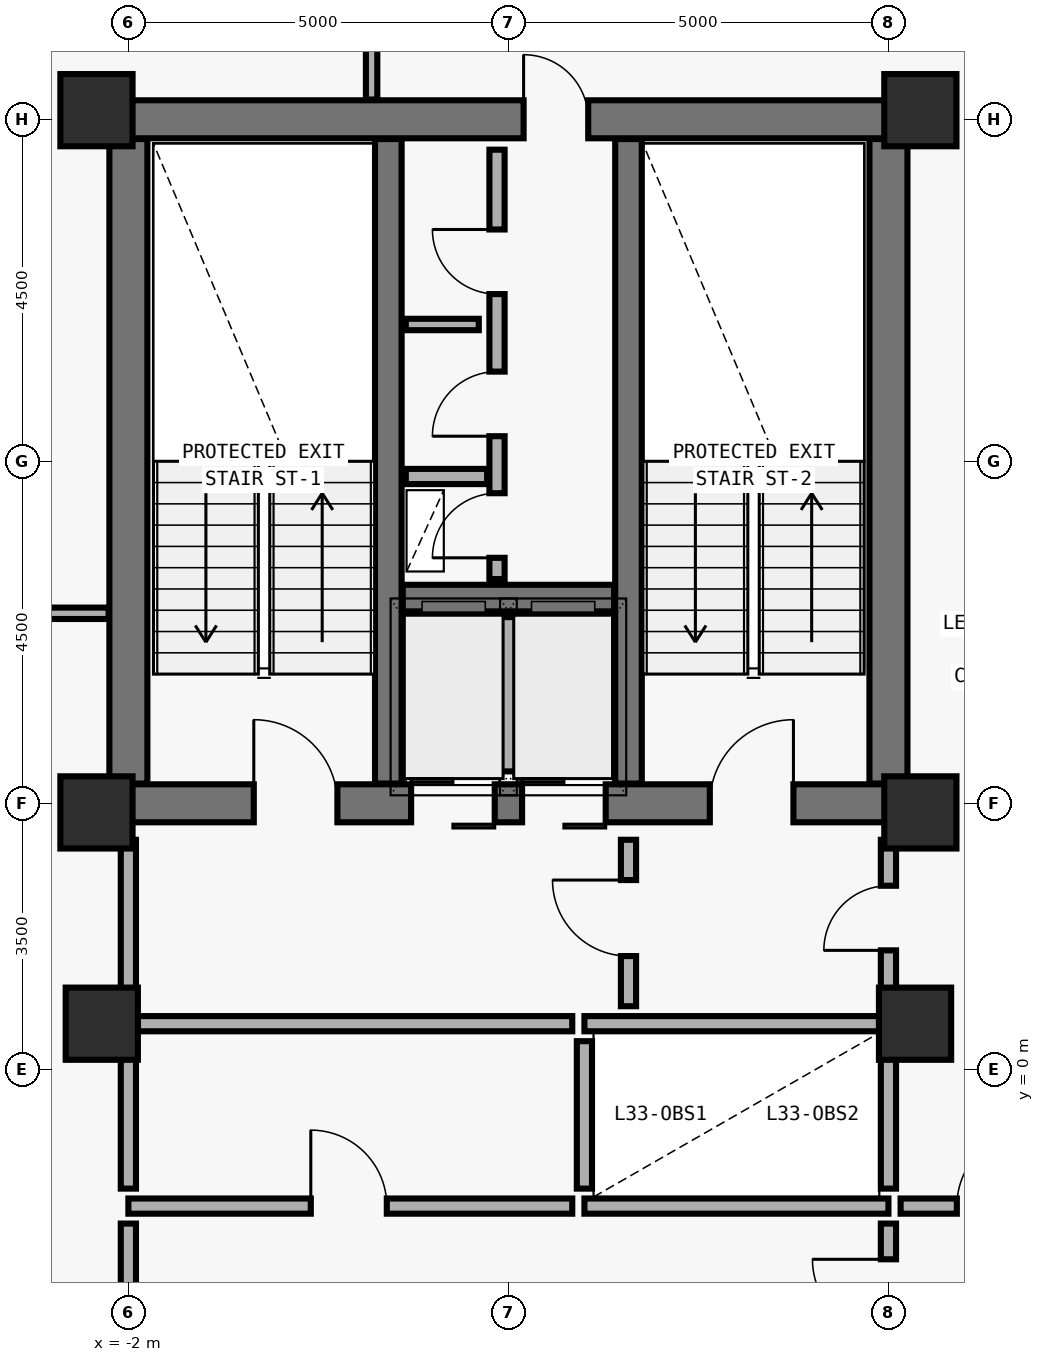
"""IFC4 building model, lengths in metres.
Left out: names, types, materials, properties, quantities, classifications, styles, units other than length and angle.
Written with IfcOpenShell. Run it as: python <this file> out.ifc"""

import sys

from ifc_helpers import new_model, si_unit, direction, frame, frame_2d, origin, origin_2d, place, context, subcontext, project, spatial, rectangle, extrude, element, fill, save


model = new_model("IFC4")
c1 = context("Model", 3, precision=1e-05, world=origin(), true_north=direction((0.0, 1.0)))
c2 = subcontext(c1, "Body", "Model", "MODEL_VIEW")
j1 = project(units=[si_unit("LENGTHUNIT", "METRE"), si_unit("PLANEANGLEUNIT", "RADIAN")], contexts=[c1])
p1 = place(None, origin())
s1 = spatial("IfcSite", under=j1, at=p1, CompositionType="ELEMENT")
p2 = place(p1, origin())
s2 = spatial("IfcBuilding", under=s1, at=p2, CompositionType="ELEMENT")
p3 = place(p2, frame((0.0, 0.0, 134.4)))
s3 = spatial("IfcBuildingStorey", under=s2, at=p3, CompositionType="ELEMENT", Elevation=134.4)
p4 = place(p3, frame((-2.0, 3.5, 0.0), z_axis=(0.0, 0.0, 1.0), x_axis=(1.0, 0.0, 0.0)))
e1 = element("IfcWall", 1, at=p4, inside=s3, PredefinedType="SHEAR", context=c2, shape_type="SweptSolid", body=[
    extrude(rectangle(XDim=10.0, YDim=0.5, at=frame_2d((5.0, 0.0))), origin(), (0.0, 0.0, 1.0), 3.892),
])
p5 = place(p4, frame((1.65, 0.0, 0.0)))
e2 = element("IfcOpeningElement", 2, at=p5, cuts=e1, PredefinedType="OPENING", context=c2, shape_type="SweptSolid", body=[
    extrude(rectangle(XDim=1.1, YDim=2.15, at=frame_2d((0.55, 1.075))), frame((0.0, 0.26, 0.0), z_axis=(0.0, -1.0, 0.0), x_axis=(1.0, 0.0, 0.0)), (0.0, 0.0, 1.0), 0.52),
])
p6 = place(p4, frame((7.65, 0.0, 0.0)))
e3 = element("IfcOpeningElement", 3, at=p6, cuts=e1, PredefinedType="OPENING", context=c2, shape_type="SweptSolid", body=[
    extrude(rectangle(XDim=1.1, YDim=2.15, at=frame_2d((0.55, 1.075))), frame((0.0, 0.26, 0.0), z_axis=(0.0, -1.0, 0.0), x_axis=(1.0, 0.0, 0.0)), (0.0, 0.0, 1.0), 0.52),
])
p7 = place(p4, frame((3.72, 0.0, 0.0)))
e4 = element("IfcOpeningElement", 4, at=p7, cuts=e1, PredefinedType="OPENING", context=c2, shape_type="SweptSolid", body=[
    extrude(rectangle(XDim=1.1, YDim=2.2, at=frame_2d((0.55, 1.1))), frame((0.0, 0.26, 0.0), z_axis=(0.0, -1.0, 0.0), x_axis=(1.0, 0.0, 0.0)), (0.0, 0.0, 1.0), 0.52),
])
p8 = place(p4, frame((5.18, 0.0, 0.0)))
e5 = element("IfcOpeningElement", 5, at=p8, cuts=e1, PredefinedType="OPENING", context=c2, shape_type="SweptSolid", body=[
    extrude(rectangle(XDim=1.1, YDim=2.2, at=frame_2d((0.55, 1.1))), frame((0.0, 0.26, 0.0), z_axis=(0.0, -1.0, 0.0), x_axis=(1.0, 0.0, 0.0)), (0.0, 0.0, 1.0), 0.52),
])
p9 = place(p3, frame((-2.0, 12.5, 0.0), z_axis=(0.0, 0.0, 1.0), x_axis=(1.0, 0.0, 0.0)))
e6 = element("IfcWall", 6, at=p9, inside=s3, PredefinedType="SHEAR", context=c2, shape_type="SweptSolid", body=[
    extrude(rectangle(XDim=10.0, YDim=0.5, at=frame_2d((5.0, 0.0))), origin(), (0.0, 0.0, 1.0), 3.892),
])
p10 = place(p9, frame((5.2, 0.0, 0.0)))
e7 = element("IfcOpeningElement", 7, at=p10, cuts=e6, PredefinedType="OPENING", context=c2, shape_type="SweptSolid", body=[
    extrude(rectangle(XDim=0.85, YDim=2.1, at=frame_2d((0.425, 1.05))), frame((0.0, 0.26, 0.0), z_axis=(0.0, -1.0, 0.0), x_axis=(1.0, 0.0, 0.0)), (0.0, 0.0, 1.0), 0.52),
])
for number, where, z_axis, x_axis in (
    (8, (-2.0, 3.76, 0.0), (0.0, 0.0, 1.0), (0.0, 1.0, 0.0)),
    (9, (8.0, 3.76, 0.0), (0.0, 0.0, 1.0), (0.0, 1.0, 0.0)),
):
    element("IfcWall", number, at=place(p3, frame(where, z_axis=z_axis, x_axis=x_axis)), inside=s3, PredefinedType="SHEAR", context=c2, shape_type="SweptSolid", body=[
        extrude(rectangle(XDim=8.48, YDim=0.5, at=frame_2d((4.24, 0.0))), origin(), (0.0, 0.0, 1.0), 3.892),
    ])
for number, where, z_axis, x_axis in (
    (10, (1.42, 3.76, 0.0), (0.0, 0.0, 1.0), (0.0, 1.0, 0.0)),
    (11, (4.58, 3.76, 0.0), (0.0, 0.0, 1.0), (0.0, 1.0, 0.0)),
):
    element("IfcWall", number, at=place(p3, frame(where, z_axis=z_axis, x_axis=x_axis)), inside=s3, PredefinedType="SHEAR", context=c2, shape_type="SweptSolid", body=[
        extrude(rectangle(XDim=8.48, YDim=0.35, at=frame_2d((4.24, 0.0))), origin(), (0.0, 0.0, 1.0), 3.892),
    ])
p11 = place(p3, frame((1.61, 6.2, 0.0), z_axis=(0.0, 0.0, 1.0), x_axis=(1.0, 0.0, 0.0)))
e12 = element("IfcWall", 12, at=p11, inside=s3, PredefinedType="SHEAR", context=c2, shape_type="SweptSolid", body=[
    extrude(rectangle(XDim=2.78, YDim=0.35, at=frame_2d((1.39, 0.0))), origin(), (0.0, 0.0, 1.0), 3.892),
])
for number, where, z_axis, x_axis in (
    (13, (-2.42, 12.62, 0.0), (0.0, 0.0, 1.0), (1.0, 0.0, 0.0)),
    (14, (8.42, 12.62, 0.0), (0.0, 0.0, 1.0), (1.0, 0.0, 0.0)),
    (15, (-2.42, 3.38, 0.0), (0.0, 0.0, 1.0), (1.0, 0.0, 0.0)),
    (16, (8.42, 3.38, 0.0), (0.0, 0.0, 1.0), (1.0, 0.0, 0.0)),
    (17, (-2.35, 0.6, 0.0), (0.0, 0.0, 1.0), (1.0, 0.0, 0.0)),
    (18, (8.35, 0.6, 0.0), (0.0, 0.0, 1.0), (1.0, 0.0, 0.0)),
):
    element("IfcColumn", number, at=place(p3, frame(where, z_axis=z_axis, x_axis=x_axis)), inside=s3, PredefinedType="COLUMN", context=c2, shape_type="SweptSolid", body=[
        extrude(rectangle(XDim=0.95, YDim=0.95, at=origin_2d()), origin(), (0.0, 0.0, 1.0), 3.875),
    ])
p12 = place(p3, frame((3.0, 3.92, 0.0), z_axis=(0.0, 0.0, 1.0), x_axis=(0.0, 1.0, 0.0)))
e19 = element("IfcWall", 19, at=p12, inside=s3, PredefinedType="SOLIDWALL", context=c2, shape_type="SweptSolid", body=[
    extrude(rectangle(XDim=2.03, YDim=0.2, at=frame_2d((1.015, 0.0))), origin(), (0.0, 0.0, 1.0), 3.64),
])
p13 = place(p3, frame((1.65, 7.8, 0.0), z_axis=(0.0, 0.0, 1.0), x_axis=(1.0, 0.0, 0.0)))
e20 = element("IfcWall", 20, at=p13, inside=s3, PredefinedType="SOLIDWALL", context=c2, shape_type="SweptSolid", body=[
    extrude(rectangle(XDim=1.07, YDim=0.2, at=frame_2d((0.535, 0.0))), origin(), (0.0, 0.0, 1.0), 3.64),
])
p14 = place(p3, frame((4.0, 0.6, 0.0), z_axis=(0.0, 0.0, 1.0), x_axis=(1.0, 0.0, 0.0)))
e21 = element("IfcWall", 21, at=p14, inside=s3, PredefinedType="SOLIDWALL", context=c2, shape_type="SweptSolid", body=[
    extrude(rectangle(XDim=3.88, YDim=0.2, at=frame_2d((1.94, 0.0))), origin(), (0.0, 0.0, 1.0), 3.222),
])
p15 = place(p3, frame((4.0, -1.8, 0.0), z_axis=(0.0, 0.0, 1.0), x_axis=(1.0, 0.0, 0.0)))
e22 = element("IfcWall", 22, at=p15, inside=s3, PredefinedType="SOLIDWALL", context=c2, shape_type="SweptSolid", body=[
    extrude(rectangle(XDim=4.0, YDim=0.2, at=frame_2d((2.0, 0.0))), origin(), (0.0, 0.0, 1.0), 3.64),
])
p16 = place(p3, frame((4.0, -1.57, 0.0), z_axis=(0.0, 0.0, 1.0), x_axis=(0.0, 1.0, 0.0)))
e23 = element("IfcWall", 23, at=p16, inside=s3, PredefinedType="SOLIDWALL", context=c2, shape_type="SweptSolid", body=[
    extrude(rectangle(XDim=1.94, YDim=0.2, at=frame_2d((0.97, 0.0))), origin(), (0.0, 0.0, 1.0), 3.64),
])
p17 = place(p3, frame((8.0, -1.57, 0.0), z_axis=(0.0, 0.0, 1.0), x_axis=(0.0, 1.0, 0.0)))
e24 = element("IfcWall", 24, at=p17, inside=s3, PredefinedType="SOLIDWALL", context=c2, shape_type="SweptSolid", body=[
    extrude(rectangle(XDim=2.05, YDim=0.2, at=frame_2d((1.025, 0.0))), origin(), (0.0, 0.0, 1.0), 3.072),
])
p18 = place(p3, frame((2.85, 6.45, 0.0), z_axis=(0.0, 0.0, 1.0), x_axis=(0.0, 1.0, 0.0)))
e25 = element("IfcWall", 25, at=p18, inside=s3, PredefinedType="MOVABLE", context=c2, shape_type="SweptSolid", body=[
    extrude(rectangle(XDim=5.65, YDim=0.2, at=frame_2d((2.825, 0.0))), origin(), (0.0, 0.0, 1.0), 3.64),
])
p19 = place(p18, frame((1.88, 0.0, 0.0)))
e26 = element("IfcOpeningElement", 26, at=p19, cuts=e25, PredefinedType="OPENING", context=c2, shape_type="SweptSolid", body=[
    extrude(rectangle(XDim=0.85, YDim=2.05, at=frame_2d((0.425, 1.025))), frame((0.0, 0.11, 0.0), z_axis=(0.0, -1.0, 0.0), x_axis=(1.0, 0.0, 0.0)), (0.0, 0.0, 1.0), 0.22),
])
p20 = place(p18, frame((3.75, 0.0, 0.0)))
e27 = element("IfcOpeningElement", 27, at=p20, cuts=e25, PredefinedType="OPENING", context=c2, shape_type="SweptSolid", body=[
    extrude(rectangle(XDim=0.85, YDim=2.1, at=frame_2d((0.425, 1.05))), frame((0.0, 0.11, 0.0), z_axis=(0.0, -1.0, 0.0), x_axis=(1.0, 0.0, 0.0)), (0.0, 0.0, 1.0), 0.22),
])
p21 = place(p18, frame((0.28, 0.0, 0.0)))
e28 = element("IfcOpeningElement", 28, at=p21, cuts=e25, PredefinedType="OPENING", context=c2, shape_type="SweptSolid", body=[
    extrude(rectangle(XDim=0.85, YDim=2.1, at=frame_2d((0.425, 1.05))), frame((0.0, 0.11, 0.0), z_axis=(0.0, -1.0, 0.0), x_axis=(1.0, 0.0, 0.0)), (0.0, 0.0, 1.0), 0.22),
])
p22 = place(p3, frame((4.58, 0.83, 0.0), z_axis=(0.0, 0.0, 1.0), x_axis=(0.0, 1.0, 0.0)))
e29 = element("IfcWall", 29, at=p22, inside=s3, PredefinedType="MOVABLE", context=c2, shape_type="SweptSolid", body=[
    extrude(rectangle(XDim=2.19, YDim=0.2, at=frame_2d((1.095, 0.0))), origin(), (0.0, 0.0, 1.0), 3.64),
])
p23 = place(p22, frame((0.66, 0.0, 0.0)))
e30 = element("IfcOpeningElement", 30, at=p23, cuts=e29, PredefinedType="OPENING", context=c2, shape_type="SweptSolid", body=[
    extrude(rectangle(XDim=1.0, YDim=2.1, at=frame_2d((0.5, 1.05))), frame((0.0, 0.11, 0.0), z_axis=(0.0, -1.0, 0.0), x_axis=(1.0, 0.0, 0.0)), (0.0, 0.0, 1.0), 0.22),
])
p24 = place(p3, frame((8.0, 0.72, 0.0), z_axis=(0.0, 0.0, 1.0), x_axis=(0.0, 1.0, 0.0)))
e31 = element("IfcWall", 31, at=p24, inside=s3, PredefinedType="MOVABLE", context=c2, shape_type="SweptSolid", body=[
    extrude(rectangle(XDim=2.3, YDim=0.2, at=frame_2d((1.15, 0.0))), origin(), (0.0, 0.0, 1.0), 2.872),
])
p25 = place(p24, frame((0.845, 0.0, 0.0)))
e32 = element("IfcOpeningElement", 32, at=p25, cuts=e31, PredefinedType="OPENING", context=c2, shape_type="SweptSolid", body=[
    extrude(rectangle(XDim=0.85, YDim=2.1, at=frame_2d((0.425, 1.05))), frame((0.0, 0.11, 0.0), z_axis=(0.0, -1.0, 0.0), x_axis=(1.0, 0.0, 0.0)), (0.0, 0.0, 1.0), 0.22),
])
p26 = place(p3, frame((8.0, -3.97, 0.0), z_axis=(0.0, 0.0, 1.0), x_axis=(0.0, 1.0, 0.0)))
e33 = element("IfcWall", 33, at=p26, inside=s3, PredefinedType="MOVABLE", context=c2, shape_type="SweptSolid", body=[
    extrude(rectangle(XDim=1.94, YDim=0.2, at=frame_2d((0.97, 0.0))), origin(), (0.0, 0.0, 1.0), 3.072),
])
p27 = place(p26, frame((0.47, 0.0, 0.0)))
e34 = element("IfcOpeningElement", 34, at=p27, cuts=e33, PredefinedType="OPENING", context=c2, shape_type="SweptSolid", body=[
    extrude(rectangle(XDim=1.0, YDim=2.1, at=frame_2d((0.5, 1.05))), frame((0.0, 0.11, 0.0), z_axis=(0.0, -1.0, 0.0), x_axis=(1.0, 0.0, 0.0)), (0.0, 0.0, 1.0), 0.22),
])
p28 = place(p3, frame((-2.0, -1.8, 0.0), z_axis=(0.0, 0.0, 1.0), x_axis=(1.0, 0.0, 0.0)))
e35 = element("IfcWall", 35, at=p28, inside=s3, PredefinedType="MOVABLE", context=c2, shape_type="SweptSolid", body=[
    extrude(rectangle(XDim=5.84, YDim=0.2, at=frame_2d((2.92, 0.0))), origin(), (0.0, 0.0, 1.0), 3.64),
])
p29 = place(p28, frame((2.4, 0.0, 0.0)))
e36 = element("IfcOpeningElement", 36, at=p29, cuts=e35, PredefinedType="OPENING", context=c2, shape_type="SweptSolid", body=[
    extrude(rectangle(XDim=1.0, YDim=2.1, at=frame_2d((0.5, 1.05))), frame((0.0, 0.11, 0.0), z_axis=(0.0, -1.0, 0.0), x_axis=(1.0, 0.0, 0.0)), (0.0, 0.0, 1.0), 0.22),
])
p30 = place(p3, frame((8.16, -1.8, 0.0), z_axis=(0.0, 0.0, 1.0), x_axis=(1.0, 0.0, 0.0)))
e37 = element("IfcWall", 37, at=p30, inside=s3, PredefinedType="MOVABLE", context=c2, shape_type="SweptSolid", body=[
    extrude(rectangle(XDim=2.64, YDim=0.2, at=frame_2d((1.32, 0.0))), origin(), (0.0, 0.0, 1.0), 3.64),
])
p31 = place(p30, frame((0.74, 0.0, 0.0)))
e38 = element("IfcOpeningElement", 38, at=p31, cuts=e37, PredefinedType="OPENING", context=c2, shape_type="SweptSolid", body=[
    extrude(rectangle(XDim=1.0, YDim=2.1, at=frame_2d((0.5, 1.05))), frame((0.0, 0.11, 0.0), z_axis=(0.0, -1.0, 0.0), x_axis=(1.0, 0.0, 0.0)), (0.0, 0.0, 1.0), 0.22),
])
p32 = place(p3, frame((1.65, 9.8, 0.0), z_axis=(0.0, 0.0, 1.0), x_axis=(1.0, 0.0, 0.0)))
e39 = element("IfcWall", 39, at=p32, inside=s3, PredefinedType="PARTITIONING", context=c2, shape_type="SweptSolid", body=[
    extrude(rectangle(XDim=0.96, YDim=0.15, at=frame_2d((0.48, 0.0))), origin(), (0.0, 0.0, 1.0), 3.64),
])
p33 = place(p3, frame((-1.88, 0.6, 0.0), z_axis=(0.0, 0.0, 1.0), x_axis=(1.0, 0.0, 0.0)))
e40 = element("IfcWall", 40, at=p33, inside=s3, PredefinedType="MOVABLE", context=c2, shape_type="SweptSolid", body=[
    extrude(rectangle(XDim=5.72, YDim=0.2, at=frame_2d((2.86, 0.0))), origin(), (0.0, 0.0, 1.0), 3.222),
])
p34 = place(p3, frame((-2.0, 0.72, 0.0), z_axis=(0.0, 0.0, 1.0), x_axis=(0.0, 1.0, 0.0)))
e41 = element("IfcWall", 41, at=p34, inside=s3, PredefinedType="MOVABLE", context=c2, shape_type="SweptSolid", body=[
    extrude(rectangle(XDim=2.3, YDim=0.2, at=frame_2d((1.15, 0.0))), origin(), (0.0, 0.0, 1.0), 2.872),
])
p35 = place(p3, frame((-2.0, -3.97, 0.0), z_axis=(0.0, 0.0, 1.0), x_axis=(0.0, 1.0, 0.0)))
e42 = element("IfcWall", 42, at=p35, inside=s3, PredefinedType="MOVABLE", context=c2, shape_type="SweptSolid", body=[
    extrude(rectangle(XDim=1.94, YDim=0.2, at=frame_2d((0.97, 0.0))), origin(), (0.0, 0.0, 1.0), 3.022),
])
p36 = place(p3, frame((-2.0, -1.57, 0.0), z_axis=(0.0, 0.0, 1.0), x_axis=(0.0, 1.0, 0.0)))
e43 = element("IfcWall", 43, at=p36, inside=s3, PredefinedType="MOVABLE", context=c2, shape_type="SweptSolid", body=[
    extrude(rectangle(XDim=2.05, YDim=0.2, at=frame_2d((1.025, 0.0))), origin(), (0.0, 0.0, 1.0), 3.022),
])
p37 = place(p3, frame((-4.465, 6.0, 0.0), z_axis=(0.0, 0.0, 1.0), x_axis=(1.0, 0.0, 0.0)))
e44 = element("IfcWall", 44, at=p37, inside=s3, PredefinedType="PARTITIONING", context=c2, shape_type="SweptSolid", body=[
    extrude(rectangle(XDim=2.205, YDim=0.15, at=frame_2d((1.103, 0.0))), origin(), (0.0, 0.0, 1.0), 3.64),
])
p38 = place(p3, frame((1.2, 14.615, 0.0), z_axis=(0.0, 0.0, 1.0), x_axis=(0.0, -1.0, 0.0)))
e45 = element("IfcWall", 45, at=p38, inside=s3, PredefinedType="PARTITIONING", context=c2, shape_type="SweptSolid", body=[
    extrude(rectangle(XDim=1.855, YDim=0.15, at=frame_2d((0.927, 0.0))), origin(), (0.0, 0.0, 1.0), 3.64),
])
p39 = place(p5, origin())
e46 = element("IfcDoor", 46, at=p39, inside=s3, OperationType="SINGLE_SWING_LEFT", PredefinedType="DOOR", context=c2, shape_type="SweptSolid", body=[
    extrude(rectangle(XDim=1.1, YDim=2.15, at=frame_2d((0.55, 1.075))), frame((0.0, 0.025, 0.0), z_axis=(0.0, -1.0, 0.0), x_axis=(1.0, 0.0, 0.0)), (0.0, 0.0, 1.0), 0.05),
])
fill(e2, e46)
p40 = place(p6, origin())
e47 = element("IfcDoor", 47, at=p40, inside=s3, OperationType="SINGLE_SWING_RIGHT", PredefinedType="DOOR", context=c2, shape_type="SweptSolid", body=[
    extrude(rectangle(XDim=1.1, YDim=2.15, at=frame_2d((0.55, 1.075))), frame((0.0, 0.025, 0.0), z_axis=(0.0, -1.0, 0.0), x_axis=(1.0, 0.0, 0.0)), (0.0, 0.0, 1.0), 0.05),
])
fill(e3, e47)
p41 = place(p7, origin())
e48 = element("IfcDoor", 48, at=p41, inside=s3, OperationType="DOUBLE_DOOR_SLIDING", PredefinedType="DOOR", context=c2, shape_type="SweptSolid", body=[
    extrude(rectangle(XDim=1.1, YDim=2.2, at=frame_2d((0.55, 1.1))), frame((0.0, 0.025, 0.0), z_axis=(0.0, -1.0, 0.0), x_axis=(1.0, 0.0, 0.0)), (0.0, 0.0, 1.0), 0.05),
])
fill(e4, e48)
p42 = place(p8, origin())
e49 = element("IfcDoor", 49, at=p42, inside=s3, OperationType="DOUBLE_DOOR_SLIDING", PredefinedType="DOOR", context=c2, shape_type="SweptSolid", body=[
    extrude(rectangle(XDim=1.1, YDim=2.2, at=frame_2d((0.55, 1.1))), frame((0.0, 0.025, 0.0), z_axis=(0.0, -1.0, 0.0), x_axis=(1.0, 0.0, 0.0)), (0.0, 0.0, 1.0), 0.05),
])
fill(e5, e49)
p43 = place(p10, origin())
e50 = element("IfcDoor", 50, at=p43, inside=s3, OperationType="SINGLE_SWING_LEFT", PredefinedType="DOOR", context=c2, shape_type="SweptSolid", body=[
    extrude(rectangle(XDim=0.85, YDim=2.1, at=frame_2d((0.425, 1.05))), frame((0.0, 0.025, 0.0), z_axis=(0.0, -1.0, 0.0), x_axis=(1.0, 0.0, 0.0)), (0.0, 0.0, 1.0), 0.05),
])
fill(e7, e50)
p44 = place(p19, origin())
e51 = element("IfcDoor", 51, at=p44, inside=s3, OperationType="SINGLE_SWING_LEFT", PredefinedType="DOOR", context=c2, shape_type="SweptSolid", body=[
    extrude(rectangle(XDim=0.85, YDim=2.05, at=frame_2d((0.425, 1.025))), frame((0.0, 0.025, 0.0), z_axis=(0.0, -1.0, 0.0), x_axis=(1.0, 0.0, 0.0)), (0.0, 0.0, 1.0), 0.05),
])
fill(e26, e51)
p45 = place(p20, origin())
e52 = element("IfcDoor", 52, at=p45, inside=s3, OperationType="SINGLE_SWING_RIGHT", PredefinedType="DOOR", context=c2, shape_type="SweptSolid", body=[
    extrude(rectangle(XDim=0.85, YDim=2.1, at=frame_2d((0.425, 1.05))), frame((0.0, 0.025, 0.0), z_axis=(0.0, -1.0, 0.0), x_axis=(1.0, 0.0, 0.0)), (0.0, 0.0, 1.0), 0.05),
])
fill(e27, e52)
p46 = place(p21, origin())
e53 = element("IfcDoor", 53, at=p46, inside=s3, OperationType="SINGLE_SWING_LEFT", PredefinedType="DOOR", context=c2, shape_type="SweptSolid", body=[
    extrude(rectangle(XDim=0.85, YDim=2.1, at=frame_2d((0.425, 1.05))), frame((0.0, 0.025, 0.0), z_axis=(0.0, -1.0, 0.0), x_axis=(1.0, 0.0, 0.0)), (0.0, 0.0, 1.0), 0.05),
])
fill(e28, e53)
p47 = place(p23, origin())
e54 = element("IfcDoor", 54, at=p47, inside=s3, OperationType="SINGLE_SWING_RIGHT", PredefinedType="DOOR", context=c2, shape_type="SweptSolid", body=[
    extrude(rectangle(XDim=1.0, YDim=2.1, at=frame_2d((0.5, 1.05))), frame((0.0, 0.025, 0.0), z_axis=(0.0, -1.0, 0.0), x_axis=(1.0, 0.0, 0.0)), (0.0, 0.0, 1.0), 0.05),
])
fill(e30, e54)
p48 = place(p25, origin())
e55 = element("IfcDoor", 55, at=p48, inside=s3, OperationType="SINGLE_SWING_LEFT", PredefinedType="DOOR", context=c2, shape_type="SweptSolid", body=[
    extrude(rectangle(XDim=0.85, YDim=2.1, at=frame_2d((0.425, 1.05))), frame((0.0, 0.025, 0.0), z_axis=(0.0, -1.0, 0.0), x_axis=(1.0, 0.0, 0.0)), (0.0, 0.0, 1.0), 0.05),
])
fill(e32, e55)
p49 = place(p27, origin())
e56 = element("IfcDoor", 56, at=p49, inside=s3, OperationType="SINGLE_SWING_RIGHT", PredefinedType="DOOR", context=c2, shape_type="SweptSolid", body=[
    extrude(rectangle(XDim=1.0, YDim=2.1, at=frame_2d((0.5, 1.05))), frame((0.0, 0.025, 0.0), z_axis=(0.0, -1.0, 0.0), x_axis=(1.0, 0.0, 0.0)), (0.0, 0.0, 1.0), 0.05),
])
fill(e34, e56)
p50 = place(p29, origin())
e57 = element("IfcDoor", 57, at=p50, inside=s3, OperationType="SINGLE_SWING_LEFT", PredefinedType="DOOR", context=c2, shape_type="SweptSolid", body=[
    extrude(rectangle(XDim=1.0, YDim=2.1, at=frame_2d((0.5, 1.05))), frame((0.0, 0.025, 0.0), z_axis=(0.0, -1.0, 0.0), x_axis=(1.0, 0.0, 0.0)), (0.0, 0.0, 1.0), 0.05),
])
fill(e36, e57)
p51 = place(p31, origin())
e58 = element("IfcDoor", 58, at=p51, inside=s3, OperationType="SINGLE_SWING_RIGHT", PredefinedType="DOOR", context=c2, shape_type="SweptSolid", body=[
    extrude(rectangle(XDim=1.0, YDim=2.1, at=frame_2d((0.5, 1.05))), frame((0.0, 0.025, 0.0), z_axis=(0.0, -1.0, 0.0), x_axis=(1.0, 0.0, 0.0)), (0.0, 0.0, 1.0), 0.05),
])
fill(e38, e58)
save(model, sys.argv[1])
